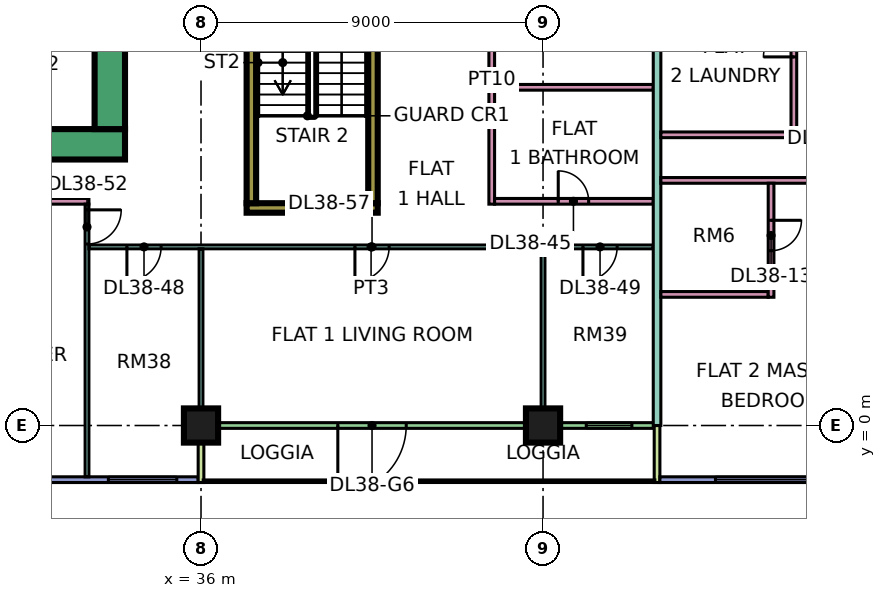
"""IFC4 building model, lengths in metres.
Left out: names, types, materials, properties, quantities, classifications, styles, units other than length and angle.
Written with IfcOpenShell. Run it as: python <this file> out.ifc"""

import sys

from ifc_helpers import new_model, si_unit, direction, frame, frame_2d, origin, origin_2d, place, context, subcontext, project, spatial, rectangle, extrude, element, fill, save


model = new_model("IFC4")
c1 = context("Model", 3, precision=1e-05, world=origin(), true_north=direction((0.0, 1.0)))
c2 = subcontext(c1, "Body", "Model", "MODEL_VIEW")
j1 = project(units=[si_unit("LENGTHUNIT", "METRE"), si_unit("PLANEANGLEUNIT", "RADIAN")], contexts=[c1])
p1 = place(None, origin())
s1 = spatial("IfcSite", under=j1, at=p1, CompositionType="ELEMENT")
p2 = place(p1, origin())
s2 = spatial("IfcBuilding", under=s1, at=p2, CompositionType="ELEMENT")
p3 = place(p2, frame((0.0, 0.0, 168.65)))
s3 = spatial("IfcBuildingStorey", under=s2, at=p3, CompositionType="ELEMENT", Elevation=168.65)
for number, where, z_axis, x_axis in (
    (1, (36.0, 0.0, 0.0), (0.0, 0.0, 1.0), (1.0, 0.0, 0.0)),
    (2, (45.0, 0.0, 0.0), (0.0, 0.0, 1.0), (1.0, 0.0, 0.0)),
):
    element("IfcColumn", number, at=place(p3, frame(where, z_axis=z_axis, x_axis=x_axis)), inside=s3, PredefinedType="COLUMN", context=c2, shape_type="SweptSolid", body=[
        extrude(rectangle(XDim=0.9, YDim=0.9, at=origin_2d()), origin(), (0.0, 0.0, 1.0), 3.75),
    ])
p4 = place(p3, frame((9.0, 7.4, 0.0), z_axis=(0.0, 0.0, 1.0), x_axis=(1.0, 0.0, 0.0)))
e3 = element("IfcWall", 3, at=p4, inside=s3, PredefinedType="SHEAR", context=c2, shape_type="SweptSolid", body=[
    extrude(rectangle(XDim=25.0, YDim=0.8, at=frame_2d((12.5, 0.0))), origin(), (0.0, 0.0, 1.0), 3.75),
])
p5 = place(p3, frame((33.6, 7.8, 0.0), z_axis=(0.0, 0.0, 1.0), x_axis=(0.0, 1.0, 0.0)))
e4 = element("IfcWall", 4, at=p5, inside=s3, PredefinedType="SHEAR", context=c2, shape_type="SweptSolid", body=[
    extrude(rectangle(XDim=11.4, YDim=0.8, at=frame_2d((5.7, 0.0))), origin(), (0.0, 0.0, 1.0), 3.75),
])
p6 = place(p5, frame((5.4, 0.0, 0.0)))
e5 = element("IfcOpeningElement", 5, at=p6, cuts=e4, PredefinedType="OPENING", context=c2, shape_type="SweptSolid", body=[
    extrude(rectangle(XDim=1.8, YDim=2.4, at=frame_2d((0.9, 1.2))), frame((0.0, 0.41, 0.0), z_axis=(0.0, -1.0, 0.0), x_axis=(1.0, 0.0, 0.0)), (0.0, 0.0, 1.0), 0.82),
])
p7 = place(p3, frame((37.2, 5.725, 0.0), z_axis=(0.0, 0.0, 1.0), x_axis=(1.0, 0.0, 0.0)))
e6 = element("IfcWall", 6, at=p7, inside=s3, PredefinedType="SHEAR", context=c2, shape_type="SweptSolid", body=[
    extrude(rectangle(XDim=3.45, YDim=0.25, at=frame_2d((1.725, 0.0))), origin(), (0.0, 0.0, 1.0), 3.75),
])
for number, where, z_axis, x_axis in (
    (7, (37.325, 5.85, 0.0), (0.0, 0.0, 1.0), (0.0, 1.0, 0.0)),
    (8, (40.525, 5.85, 0.0), (0.0, 0.0, 1.0), (0.0, 1.0, 0.0)),
):
    element("IfcWall", number, at=place(p3, frame(where, z_axis=z_axis, x_axis=x_axis)), inside=s3, PredefinedType="SHEAR", context=c2, shape_type="SweptSolid", body=[
        extrude(rectangle(XDim=6.5, YDim=0.25, at=frame_2d((3.25, 0.0))), origin(), (0.0, 0.0, 1.0), 3.75),
    ])
p8 = place(p3, frame((24.075, -1.425, 0.0), z_axis=(0.0, 0.0, 1.0), x_axis=(1.0, 0.0, 0.0)))
e9 = element("IfcWall", 9, at=p8, inside=s3, PredefinedType="SOLIDWALL", context=c2, shape_type="SweptSolid", body=[
    extrude(rectangle(XDim=11.85, YDim=0.15, at=frame_2d((5.925, 0.0))), origin(), (0.0, 0.0, 1.0), 3.35),
])
p9 = place(p8, frame((0.562, 0.0, 0.45)))
e10 = element("IfcOpeningElement", 10, at=p9, cuts=e9, PredefinedType="OPENING", context=c2, shape_type="SweptSolid", body=[
    extrude(rectangle(XDim=1.8, YDim=2.4, at=frame_2d((0.9, 1.2))), frame((0.0, 0.085, 0.0), z_axis=(0.0, -1.0, 0.0), x_axis=(1.0, 0.0, 0.0)), (0.0, 0.0, 1.0), 0.17),
])
p10 = place(p8, frame((4.425, 0.0, 0.45)))
e11 = element("IfcOpeningElement", 11, at=p10, cuts=e9, PredefinedType="OPENING", context=c2, shape_type="SweptSolid", body=[
    extrude(rectangle(XDim=3.0, YDim=2.4, at=frame_2d((1.5, 1.2))), frame((0.0, 0.085, 0.0), z_axis=(0.0, -1.0, 0.0), x_axis=(1.0, 0.0, 0.0)), (0.0, 0.0, 1.0), 0.17),
])
p11 = place(p8, frame((9.488, 0.0, 0.45)))
e12 = element("IfcOpeningElement", 12, at=p11, cuts=e9, PredefinedType="OPENING", context=c2, shape_type="SweptSolid", body=[
    extrude(rectangle(XDim=1.8, YDim=2.4, at=frame_2d((0.9, 1.2))), frame((0.0, 0.085, 0.0), z_axis=(0.0, -1.0, 0.0), x_axis=(1.0, 0.0, 0.0)), (0.0, 0.0, 1.0), 0.17),
])
p12 = place(p3, frame((36.075, 0.0, 0.0), z_axis=(0.0, 0.0, 1.0), x_axis=(1.0, 0.0, 0.0)))
e13 = element("IfcWall", 13, at=p12, inside=s3, PredefinedType="SOLIDWALL", context=c2, shape_type="SweptSolid", body=[
    extrude(rectangle(XDim=11.85, YDim=0.15, at=frame_2d((5.925, 0.0))), origin(), (0.0, 0.0, 1.0), 3.35),
])
p13 = place(p12, frame((3.525, 0.0, 0.0)))
e14 = element("IfcOpeningElement", 14, at=p13, cuts=e13, PredefinedType="OPENING", context=c2, shape_type="SweptSolid", body=[
    extrude(rectangle(XDim=1.8, YDim=2.4, at=frame_2d((0.9, 1.2))), frame((0.0, 0.085, 0.0), z_axis=(0.0, -1.0, 0.0), x_axis=(1.0, 0.0, 0.0)), (0.0, 0.0, 1.0), 0.17),
])
p14 = place(p12, frame((10.062, 0.0, 0.45)))
e15 = element("IfcOpeningElement", 15, at=p14, cuts=e13, PredefinedType="OPENING", context=c2, shape_type="SweptSolid", body=[
    extrude(rectangle(XDim=1.2, YDim=2.4, at=frame_2d((0.6, 1.2))), frame((0.0, 0.085, 0.0), z_axis=(0.0, -1.0, 0.0), x_axis=(1.0, 0.0, 0.0)), (0.0, 0.0, 1.0), 0.17),
])
for number, where, z_axis, x_axis in (
    (16, (36.0, -1.5, 0.0), (0.0, 0.0, 1.0), (0.0, 1.0, 0.0)),
    (17, (48.0, -1.5, 0.0), (0.0, 0.0, 1.0), (0.0, 1.0, 0.0)),
):
    element("IfcWall", number, at=place(p3, frame(where, z_axis=z_axis, x_axis=x_axis)), inside=s3, PredefinedType="SOLIDWALL", context=c2, shape_type="SweptSolid", body=[
        extrude(rectangle(XDim=1.5, YDim=0.15, at=frame_2d((0.75, 0.0))), origin(), (0.0, 0.0, 1.0), 3.35),
    ])
p15 = place(p3, frame((48.075, -1.425, 0.0), z_axis=(0.0, 0.0, 1.0), x_axis=(1.0, 0.0, 0.0)))
e18 = element("IfcWall", 18, at=p15, inside=s3, PredefinedType="SOLIDWALL", context=c2, shape_type="SweptSolid", body=[
    extrude(rectangle(XDim=13.425, YDim=0.15, at=frame_2d((6.712, 0.0))), origin(), (0.0, 0.0, 1.0), 3.35),
])
p16 = place(p15, frame((1.462, 0.0, 0.45)))
e19 = element("IfcOpeningElement", 19, at=p16, cuts=e18, PredefinedType="OPENING", context=c2, shape_type="SweptSolid", body=[
    extrude(rectangle(XDim=3.0, YDim=2.4, at=frame_2d((1.5, 1.2))), frame((0.0, 0.085, 0.0), z_axis=(0.0, -1.0, 0.0), x_axis=(1.0, 0.0, 0.0)), (0.0, 0.0, 1.0), 0.17),
])
p17 = place(p15, frame((6.525, 0.0, 0.45)))
e20 = element("IfcOpeningElement", 20, at=p17, cuts=e18, PredefinedType="OPENING", context=c2, shape_type="SweptSolid", body=[
    extrude(rectangle(XDim=1.8, YDim=2.4, at=frame_2d((0.9, 1.2))), frame((0.0, 0.085, 0.0), z_axis=(0.0, -1.0, 0.0), x_axis=(1.0, 0.0, 0.0)), (0.0, 0.0, 1.0), 0.17),
])
p18 = place(p15, frame((9.525, 0.0, 0.45)))
e21 = element("IfcOpeningElement", 21, at=p18, cuts=e18, PredefinedType="OPENING", context=c2, shape_type="SweptSolid", body=[
    extrude(rectangle(XDim=1.8, YDim=2.4, at=frame_2d((0.9, 1.2))), frame((0.0, 0.085, 0.0), z_axis=(0.0, -1.0, 0.0), x_axis=(1.0, 0.0, 0.0)), (0.0, 0.0, 1.0), 0.17),
])
p19 = place(p15, frame((12.225, 0.0, 0.45)))
e22 = element("IfcOpeningElement", 22, at=p19, cuts=e18, PredefinedType="OPENING", context=c2, shape_type="SweptSolid", body=[
    extrude(rectangle(XDim=0.9, YDim=2.4, at=frame_2d((0.45, 1.2))), frame((0.0, 0.085, 0.0), z_axis=(0.0, -1.0, 0.0), x_axis=(1.0, 0.0, 0.0)), (0.0, 0.0, 1.0), 0.17),
])
p20 = place(p3, frame((11.95, 5.9, 0.0), z_axis=(0.0, 0.0, 1.0), x_axis=(1.0, 0.0, 0.0)))
e23 = element("IfcWall", 23, at=p20, inside=s3, PredefinedType="PARTITIONING", context=c2, shape_type="SweptSolid", body=[
    extrude(rectangle(XDim=21.1, YDim=0.15, at=frame_2d((10.55, 0.0))), origin(), (0.0, 0.0, 1.0), 3.35),
])
p21 = place(p20, frame((1.1, 0.0, 0.0)))
e24 = element("IfcOpeningElement", 24, at=p21, cuts=e23, PredefinedType="OPENING", context=c2, shape_type="SweptSolid", body=[
    extrude(rectangle(XDim=0.9, YDim=2.1, at=frame_2d((0.45, 1.05))), frame((0.0, 0.085, 0.0), z_axis=(0.0, -1.0, 0.0), x_axis=(1.0, 0.0, 0.0)), (0.0, 0.0, 1.0), 0.17),
])
p22 = place(p20, frame((4.1, 0.0, 0.0)))
e25 = element("IfcOpeningElement", 25, at=p22, cuts=e23, PredefinedType="OPENING", context=c2, shape_type="SweptSolid", body=[
    extrude(rectangle(XDim=0.9, YDim=2.1, at=frame_2d((0.45, 1.05))), frame((0.0, 0.085, 0.0), z_axis=(0.0, -1.0, 0.0), x_axis=(1.0, 0.0, 0.0)), (0.0, 0.0, 1.0), 0.17),
])
p23 = place(p20, frame((10.1, 0.0, 0.0)))
e26 = element("IfcOpeningElement", 26, at=p23, cuts=e23, PredefinedType="OPENING", context=c2, shape_type="SweptSolid", body=[
    extrude(rectangle(XDim=0.9, YDim=2.1, at=frame_2d((0.45, 1.05))), frame((0.0, 0.085, 0.0), z_axis=(0.0, -1.0, 0.0), x_axis=(1.0, 0.0, 0.0)), (0.0, 0.0, 1.0), 0.17),
])
p24 = place(p3, frame((33.0, -1.351, 0.0), z_axis=(0.0, 0.0, 1.0), x_axis=(0.0, 1.0, 0.0)))
e27 = element("IfcWall", 27, at=p24, inside=s3, PredefinedType="PARTITIONING", context=c2, shape_type="SweptSolid", body=[
    extrude(rectangle(XDim=7.176, YDim=0.1, at=frame_2d((3.588, 0.0))), origin(), (0.0, 0.0, 1.0), 3.35),
])
p25 = place(p24, frame((6.126, 0.0, 0.0)))
e28 = element("IfcOpeningElement", 28, at=p25, cuts=e27, PredefinedType="OPENING", context=c2, shape_type="SweptSolid", body=[
    extrude(rectangle(XDim=0.9, YDim=2.1, at=frame_2d((0.45, 1.05))), frame((0.0, 0.06, 0.0), z_axis=(0.0, -1.0, 0.0), x_axis=(1.0, 0.0, 0.0)), (0.0, 0.0, 1.0), 0.12),
])
p26 = place(p3, frame((33.05, 4.7, 0.0), z_axis=(0.0, 0.0, 1.0), x_axis=(1.0, 0.0, 0.0)))
e29 = element("IfcWall", 29, at=p26, inside=s3, PredefinedType="PARTITIONING", context=c2, shape_type="SweptSolid", body=[
    extrude(rectangle(XDim=14.85, YDim=0.1, at=frame_2d((7.425, 0.0))), origin(), (0.0, 0.0, 1.0), 3.35),
])
p27 = place(p26, frame((1.0, 0.0, 0.0)))
e30 = element("IfcOpeningElement", 30, at=p27, cuts=e29, PredefinedType="OPENING", context=c2, shape_type="SweptSolid", body=[
    extrude(rectangle(XDim=0.9, YDim=2.1, at=frame_2d((0.45, 1.05))), frame((0.0, 0.06, 0.0), z_axis=(0.0, -1.0, 0.0), x_axis=(1.0, 0.0, 0.0)), (0.0, 0.0, 1.0), 0.12),
])
p28 = place(p26, frame((13.0, 0.0, 0.0)))
e31 = element("IfcOpeningElement", 31, at=p28, cuts=e29, PredefinedType="OPENING", context=c2, shape_type="SweptSolid", body=[
    extrude(rectangle(XDim=0.9, YDim=2.1, at=frame_2d((0.45, 1.05))), frame((0.0, 0.06, 0.0), z_axis=(0.0, -1.0, 0.0), x_axis=(1.0, 0.0, 0.0)), (0.0, 0.0, 1.0), 0.12),
])
p29 = place(p26, frame((7.0, 0.0, 0.0)))
e32 = element("IfcOpeningElement", 32, at=p29, cuts=e29, PredefinedType="OPENING", context=c2, shape_type="SweptSolid", body=[
    extrude(rectangle(XDim=0.9, YDim=2.1, at=frame_2d((0.45, 1.05))), frame((0.0, 0.06, 0.0), z_axis=(0.0, -1.0, 0.0), x_axis=(1.0, 0.0, 0.0)), (0.0, 0.0, 1.0), 0.12),
])
p30 = place(p3, frame((36.0, 0.0, 0.0), z_axis=(0.0, 0.0, 1.0), x_axis=(0.0, 1.0, 0.0)))
e33 = element("IfcWall", 33, at=p30, inside=s3, PredefinedType="PARTITIONING", context=c2, shape_type="SweptSolid", body=[
    extrude(rectangle(XDim=4.65, YDim=0.1, at=frame_2d((2.325, 0.0))), origin(), (0.0, 0.0, 1.0), 3.35),
])
p31 = place(p3, frame((43.65, 5.825, 0.0), z_axis=(0.0, 0.0, 1.0), x_axis=(0.0, 1.0, 0.0)))
e34 = element("IfcWall", 34, at=p31, inside=s3, PredefinedType="PARTITIONING", context=c2, shape_type="SweptSolid", body=[
    extrude(rectangle(XDim=6.525, YDim=0.15, at=frame_2d((3.263, 0.0))), origin(), (0.0, 0.0, 1.0), 3.35),
])
p32 = place(p31, frame((4.425, 0.0, 0.0)))
e35 = element("IfcOpeningElement", 35, at=p32, cuts=e34, PredefinedType="OPENING", context=c2, shape_type="SweptSolid", body=[
    extrude(rectangle(XDim=0.9, YDim=2.1, at=frame_2d((0.45, 1.05))), frame((0.0, 0.085, 0.0), z_axis=(0.0, -1.0, 0.0), x_axis=(1.0, 0.0, 0.0)), (0.0, 0.0, 1.0), 0.17),
])
p33 = place(p3, frame((43.725, 5.9, 0.0), z_axis=(0.0, 0.0, 1.0), x_axis=(1.0, 0.0, 0.0)))
e36 = element("IfcWall", 36, at=p33, inside=s3, PredefinedType="PARTITIONING", context=c2, shape_type="SweptSolid", body=[
    extrude(rectangle(XDim=4.175, YDim=0.15, at=frame_2d((2.087, 0.0))), origin(), (0.0, 0.0, 1.0), 3.35),
])
p34 = place(p33, frame((1.675, 0.0, 0.0)))
e37 = element("IfcOpeningElement", 37, at=p34, cuts=e36, PredefinedType="OPENING", context=c2, shape_type="SweptSolid", body=[
    extrude(rectangle(XDim=0.8, YDim=2.1, at=frame_2d((0.4, 1.05))), frame((0.0, 0.085, 0.0), z_axis=(0.0, -1.0, 0.0), x_axis=(1.0, 0.0, 0.0)), (0.0, 0.0, 1.0), 0.17),
])
p35 = place(p3, frame((43.725, 8.9, 0.0), z_axis=(0.0, 0.0, 1.0), x_axis=(1.0, 0.0, 0.0)))
e38 = element("IfcWall", 38, at=p35, inside=s3, PredefinedType="PARTITIONING", context=c2, shape_type="SweptSolid", body=[
    extrude(rectangle(XDim=4.175, YDim=0.15, at=frame_2d((2.087, 0.0))), origin(), (0.0, 0.0, 1.0), 3.35),
])
p36 = place(p3, frame((45.0, 0.074, 0.0), z_axis=(0.0, 0.0, 1.0), x_axis=(0.0, 1.0, 0.0)))
e39 = element("IfcWall", 39, at=p36, inside=s3, PredefinedType="PARTITIONING", context=c2, shape_type="SweptSolid", body=[
    extrude(rectangle(XDim=4.576, YDim=0.1, at=frame_2d((2.288, 0.0))), origin(), (0.0, 0.0, 1.0), 3.35),
])
p37 = place(p3, frame((48.0, 0.0, 0.0), z_axis=(0.0, 0.0, 1.0), x_axis=(0.0, 1.0, 0.0)))
e40 = element("IfcWall", 40, at=p37, inside=s3, PredefinedType="PARTITIONING", context=c2, shape_type="SweptSolid", body=[
    extrude(rectangle(XDim=12.35, YDim=0.2, at=frame_2d((6.175, 0.0))), origin(), (0.0, 0.0, 1.0), 3.35),
])
p38 = place(p3, frame((48.1, 3.45, 0.0), z_axis=(0.0, 0.0, 1.0), x_axis=(1.0, 0.0, 0.0)))
e41 = element("IfcWall", 41, at=p38, inside=s3, PredefinedType="PARTITIONING", context=c2, shape_type="SweptSolid", body=[
    extrude(rectangle(XDim=2.825, YDim=0.15, at=frame_2d((1.413, 0.0))), origin(), (0.0, 0.0, 1.0), 3.35),
])
p39 = place(p3, frame((48.1, 6.45, 0.0), z_axis=(0.0, 0.0, 1.0), x_axis=(1.0, 0.0, 0.0)))
e42 = element("IfcWall", 42, at=p39, inside=s3, PredefinedType="PARTITIONING", context=c2, shape_type="SweptSolid", body=[
    extrude(rectangle(XDim=5.95, YDim=0.15, at=frame_2d((2.975, 0.0))), origin(), (0.0, 0.0, 1.0), 3.35),
])
p40 = place(p39, frame((3.95, 0.0, 0.0)))
e43 = element("IfcOpeningElement", 43, at=p40, cuts=e42, PredefinedType="OPENING", context=c2, shape_type="SweptSolid", body=[
    extrude(rectangle(XDim=0.9, YDim=2.1, at=frame_2d((0.45, 1.05))), frame((0.0, 0.085, 0.0), z_axis=(0.0, -1.0, 0.0), x_axis=(1.0, 0.0, 0.0)), (0.0, 0.0, 1.0), 0.17),
])
p41 = place(p3, frame((48.1, 7.65, 0.0), z_axis=(0.0, 0.0, 1.0), x_axis=(1.0, 0.0, 0.0)))
e44 = element("IfcWall", 44, at=p41, inside=s3, PredefinedType="PARTITIONING", context=c2, shape_type="SweptSolid", body=[
    extrude(rectangle(XDim=3.425, YDim=0.15, at=frame_2d((1.712, 0.0))), origin(), (0.0, 0.0, 1.0), 3.35),
])
p42 = place(p3, frame((51.0, 3.375, 0.0), z_axis=(0.0, 0.0, 1.0), x_axis=(0.0, 1.0, 0.0)))
e45 = element("IfcWall", 45, at=p42, inside=s3, PredefinedType="PARTITIONING", context=c2, shape_type="SweptSolid", body=[
    extrude(rectangle(XDim=3.0, YDim=0.15, at=frame_2d((1.5, 0.0))), origin(), (0.0, 0.0, 1.0), 3.35),
])
p43 = place(p42, frame((1.225, 0.0, 0.0)))
e46 = element("IfcOpeningElement", 46, at=p43, cuts=e45, PredefinedType="OPENING", context=c2, shape_type="SweptSolid", body=[
    extrude(rectangle(XDim=0.8, YDim=2.1, at=frame_2d((0.4, 1.05))), frame((0.0, 0.085, 0.0), z_axis=(0.0, -1.0, 0.0), x_axis=(1.0, 0.0, 0.0)), (0.0, 0.0, 1.0), 0.17),
])
p44 = place(p3, frame((51.6, 7.575, 0.0), z_axis=(0.0, 0.0, 1.0), x_axis=(0.0, 1.0, 0.0)))
e47 = element("IfcWall", 47, at=p44, inside=s3, PredefinedType="PARTITIONING", context=c2, shape_type="SweptSolid", body=[
    extrude(rectangle(XDim=4.775, YDim=0.15, at=frame_2d((2.388, 0.0))), origin(), (0.0, 0.0, 1.0), 3.35),
])
p45 = place(p44, frame((2.125, 0.0, 0.0)))
e48 = element("IfcOpeningElement", 48, at=p45, cuts=e47, PredefinedType="OPENING", context=c2, shape_type="SweptSolid", body=[
    extrude(rectangle(XDim=0.8, YDim=2.1, at=frame_2d((0.4, 1.05))), frame((0.0, 0.085, 0.0), z_axis=(0.0, -1.0, 0.0), x_axis=(1.0, 0.0, 0.0)), (0.0, 0.0, 1.0), 0.17),
])
p46 = place(p11, origin())
e49 = element("IfcWindow", 49, at=p46, inside=s3, PartitioningType="SINGLE_PANEL", PredefinedType="WINDOW", context=c2, shape_type="SweptSolid", body=[
    extrude(rectangle(XDim=1.8, YDim=2.4, at=frame_2d((0.9, 1.2))), frame((0.0, 0.03, 0.0), z_axis=(0.0, -1.0, 0.0), x_axis=(1.0, 0.0, 0.0)), (0.0, 0.0, 1.0), 0.06),
])
fill(e12, e49)
p47 = place(p13, frame((1.8, 0.0, 0.0), z_axis=(0.0, 0.0, 1.0), x_axis=(-1.0, 0.0, 0.0)))
e50 = element("IfcDoor", 50, at=p47, inside=s3, OperationType="DOUBLE_DOOR_SINGLE_SWING", PredefinedType="DOOR", context=c2, shape_type="SweptSolid", body=[
    extrude(rectangle(XDim=1.8, YDim=2.4, at=frame_2d((0.9, 1.2))), frame((0.0, 0.025, 0.0), z_axis=(0.0, -1.0, 0.0), x_axis=(1.0, 0.0, 0.0)), (0.0, 0.0, 1.0), 0.05),
])
fill(e14, e50)
p48 = place(p14, origin())
e51 = element("IfcWindow", 51, at=p48, inside=s3, PartitioningType="SINGLE_PANEL", PredefinedType="WINDOW", context=c2, shape_type="SweptSolid", body=[
    extrude(rectangle(XDim=1.2, YDim=2.4, at=frame_2d((0.6, 1.2))), frame((0.0, 0.03, 0.0), z_axis=(0.0, -1.0, 0.0), x_axis=(1.0, 0.0, 0.0)), (0.0, 0.0, 1.0), 0.06),
])
fill(e15, e51)
p49 = place(p16, origin())
e52 = element("IfcWindow", 52, at=p49, inside=s3, PartitioningType="SINGLE_PANEL", PredefinedType="WINDOW", context=c2, shape_type="SweptSolid", body=[
    extrude(rectangle(XDim=3.0, YDim=2.4, at=frame_2d((1.5, 1.2))), frame((0.0, 0.03, 0.0), z_axis=(0.0, -1.0, 0.0), x_axis=(1.0, 0.0, 0.0)), (0.0, 0.0, 1.0), 0.06),
])
fill(e19, e52)
p50 = place(p43, origin())
e53 = element("IfcDoor", 53, at=p50, inside=s3, OperationType="SINGLE_SWING_RIGHT", PredefinedType="DOOR", context=c2, shape_type="SweptSolid", body=[
    extrude(rectangle(XDim=0.8, YDim=2.1, at=frame_2d((0.4, 1.05))), frame((0.0, 0.025, 0.0), z_axis=(0.0, -1.0, 0.0), x_axis=(1.0, 0.0, 0.0)), (0.0, 0.0, 1.0), 0.05),
])
fill(e46, e53)
p51 = place(p45, origin())
e54 = element("IfcDoor", 54, at=p51, inside=s3, OperationType="SINGLE_SWING_LEFT", PredefinedType="DOOR", context=c2, shape_type="SweptSolid", body=[
    extrude(rectangle(XDim=0.8, YDim=2.1, at=frame_2d((0.4, 1.05))), frame((0.0, 0.025, 0.0), z_axis=(0.0, -1.0, 0.0), x_axis=(1.0, 0.0, 0.0)), (0.0, 0.0, 1.0), 0.05),
])
fill(e48, e54)
p52 = place(p34, origin())
e55 = element("IfcDoor", 55, at=p52, inside=s3, OperationType="SINGLE_SWING_LEFT", PredefinedType="DOOR", context=c2, shape_type="SweptSolid", body=[
    extrude(rectangle(XDim=0.8, YDim=2.1, at=frame_2d((0.4, 1.05))), frame((0.0, 0.025, 0.0), z_axis=(0.0, -1.0, 0.0), x_axis=(1.0, 0.0, 0.0)), (0.0, 0.0, 1.0), 0.05),
])
fill(e37, e55)
p53 = place(p27, frame((0.9, 0.0, 0.0), z_axis=(0.0, 0.0, 1.0), x_axis=(-1.0, 0.0, 0.0)))
e56 = element("IfcDoor", 56, at=p53, inside=s3, OperationType="SINGLE_SWING_LEFT", PredefinedType="DOOR", context=c2, shape_type="SweptSolid", body=[
    extrude(rectangle(XDim=0.9, YDim=2.1, at=frame_2d((0.45, 1.05))), frame((0.0, 0.025, 0.0), z_axis=(0.0, -1.0, 0.0), x_axis=(1.0, 0.0, 0.0)), (0.0, 0.0, 1.0), 0.05),
])
fill(e30, e56)
p54 = place(p28, frame((0.9, 0.0, 0.0), z_axis=(0.0, 0.0, 1.0), x_axis=(-1.0, 0.0, 0.0)))
e57 = element("IfcDoor", 57, at=p54, inside=s3, OperationType="SINGLE_SWING_LEFT", PredefinedType="DOOR", context=c2, shape_type="SweptSolid", body=[
    extrude(rectangle(XDim=0.9, YDim=2.1, at=frame_2d((0.45, 1.05))), frame((0.0, 0.025, 0.0), z_axis=(0.0, -1.0, 0.0), x_axis=(1.0, 0.0, 0.0)), (0.0, 0.0, 1.0), 0.05),
])
fill(e31, e57)
p55 = place(p25, origin())
e58 = element("IfcDoor", 58, at=p55, inside=s3, OperationType="SINGLE_SWING_RIGHT", PredefinedType="DOOR", context=c2, shape_type="SweptSolid", body=[
    extrude(rectangle(XDim=0.9, YDim=2.1, at=frame_2d((0.45, 1.05))), frame((0.0, 0.025, 0.0), z_axis=(0.0, -1.0, 0.0), x_axis=(1.0, 0.0, 0.0)), (0.0, 0.0, 1.0), 0.05),
])
fill(e28, e58)
p56 = place(p29, frame((0.9, 0.0, 0.0), z_axis=(0.0, 0.0, 1.0), x_axis=(-1.0, 0.0, 0.0)))
e59 = element("IfcDoor", 59, at=p56, inside=s3, OperationType="SINGLE_SWING_LEFT", PredefinedType="DOOR", context=c2, shape_type="SweptSolid", body=[
    extrude(rectangle(XDim=0.9, YDim=2.1, at=frame_2d((0.45, 1.05))), frame((0.0, 0.025, 0.0), z_axis=(0.0, -1.0, 0.0), x_axis=(1.0, 0.0, 0.0)), (0.0, 0.0, 1.0), 0.05),
])
fill(e32, e59)
save(model, sys.argv[1])
